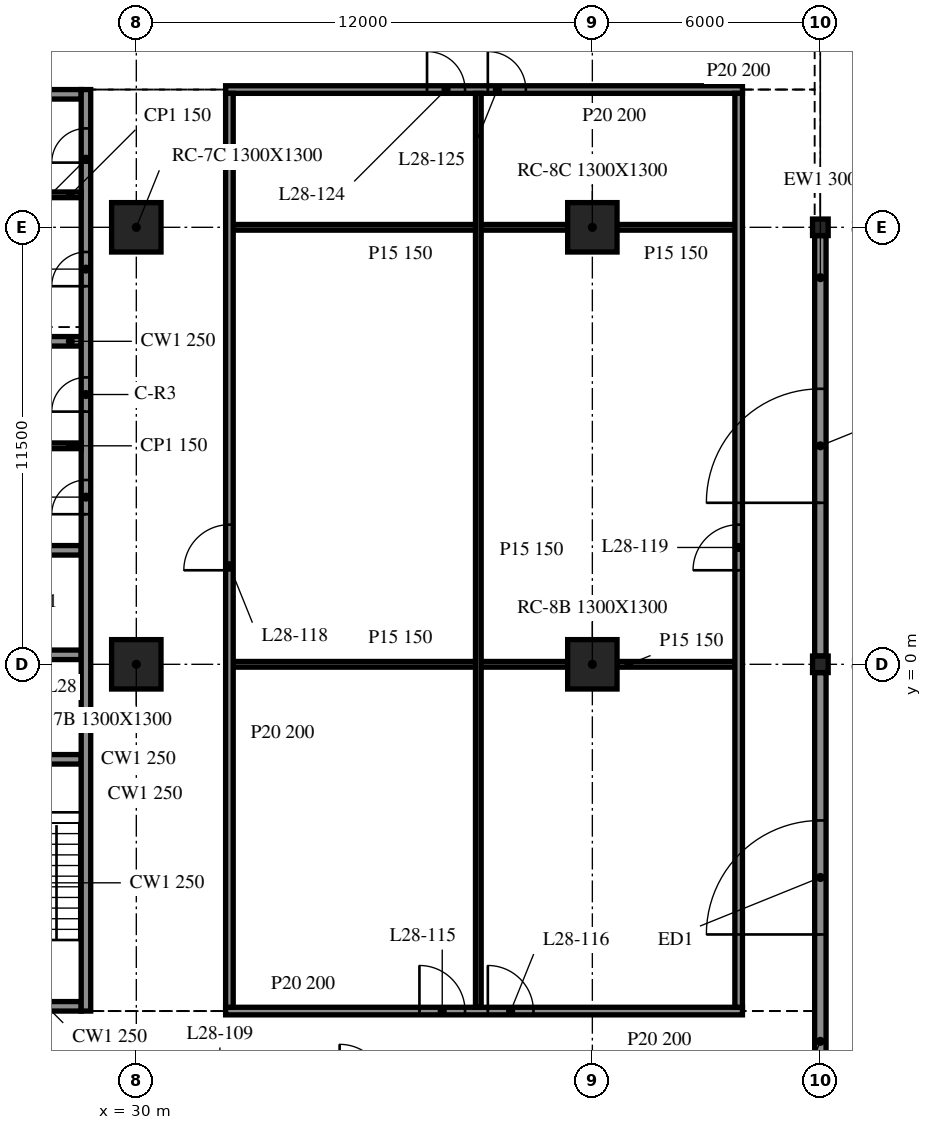
"""IFC4 building model, lengths in metres.
Left out: names, types, materials, properties, quantities, classifications, styles, units other than length and angle.
Written with IfcOpenShell. Run it as: python <this file> out.ifc"""

import sys

from ifc_helpers import new_model, si_unit, direction, frame, frame_2d, origin, origin_2d, place, context, subcontext, project, spatial, rectangle, i_section, extrude, element, fill, save


model = new_model("IFC4")
c1 = context("Model", 3, precision=1e-05, world=origin(), true_north=direction((0.0, 1.0)))
c2 = subcontext(c1, "Body", "Model", "MODEL_VIEW")
j1 = project(units=[si_unit("LENGTHUNIT", "METRE"), si_unit("PLANEANGLEUNIT", "RADIAN")], contexts=[c1])
p1 = place(None, origin())
s1 = spatial("IfcSite", under=j1, at=p1, CompositionType="ELEMENT")
p2 = place(p1, origin())
s2 = spatial("IfcBuilding", under=s1, at=p2, CompositionType="ELEMENT")
p3 = place(p2, frame((0.0, 0.0, 122.0)))
s3 = spatial("IfcBuildingStorey", under=s2, at=p3, CompositionType="ELEMENT", Elevation=122.0)
for number, where, z_axis, x_axis in (
    (1, (30.0, 0.0, -0.34), (0.0, 0.0, 1.0), (1.0, 0.0, 0.0)),
    (2, (30.0, 11.5, -0.34), (0.0, 0.0, 1.0), (1.0, 0.0, 0.0)),
    (3, (42.0, 0.0, -0.34), (0.0, 0.0, 1.0), (1.0, 0.0, 0.0)),
    (4, (42.0, 11.5, -0.34), (0.0, 0.0, 1.0), (1.0, 0.0, 0.0)),
):
    element("IfcColumn", number, at=place(p3, frame(where, z_axis=z_axis, x_axis=x_axis)), inside=s3, PredefinedType="COLUMN", context=c2, shape_type="SweptSolid", body=[
        extrude(rectangle(XDim=1.3, YDim=1.3, at=origin_2d()), origin(), (0.0, 0.0, 1.0), 4.1),
    ])
for number, where, z_axis, x_axis in (
    (5, (48.0, 0.0, -0.34), (0.0, 0.0, 1.0), (1.0, 0.0, 0.0)),
    (6, (48.0, 11.5, -0.34), (0.0, 0.0, 1.0), (1.0, 0.0, 0.0)),
):
    element("IfcColumn", number, at=place(p3, frame(where, z_axis=z_axis, x_axis=x_axis)), inside=s3, PredefinedType="COLUMN", context=c2, shape_type="SweptSolid", body=[
        extrude(i_section(OverallWidth=0.412, OverallDepth=0.434, WebThickness=0.036, FlangeThickness=0.057, at=origin_2d()), origin(), (0.0, 0.0, 1.0), 4.1),
    ])
p4 = place(p3, frame((48.0, -11.0, 0.0), z_axis=(0.0, 0.0, 1.0), x_axis=(0.0, 1.0, 0.0)))
e7 = element("IfcWall", 7, at=p4, inside=s3, PredefinedType="NOTDEFINED", context=c2, shape_type="SweptSolid", body=[
    extrude(rectangle(XDim=10.782, YDim=0.3, at=frame_2d((5.391, 0.0))), origin(), (0.0, 0.0, 1.0), 3.003),
])
p5 = place(p4, frame((3.891, 0.0, 0.0)))
e8 = element("IfcOpeningElement", 8, at=p5, cuts=e7, PredefinedType="OPENING", context=c2, shape_type="SweptSolid", body=[
    extrude(rectangle(XDim=3.0, YDim=2.4, at=frame_2d((1.5, 1.2))), frame((0.0, 0.16, 0.0), z_axis=(0.0, -1.0, 0.0), x_axis=(1.0, 0.0, 0.0)), (0.0, 0.0, 1.0), 0.32),
])
p6 = place(p3, frame((48.0, 0.218, 0.0), z_axis=(0.0, 0.0, 1.0), x_axis=(0.0, 1.0, 0.0)))
e9 = element("IfcWall", 9, at=p6, inside=s3, PredefinedType="NOTDEFINED", context=c2, shape_type="SweptSolid", body=[
    extrude(rectangle(XDim=11.064, YDim=0.3, at=frame_2d((5.532, 0.0))), origin(), (0.0, 0.0, 1.0), 3.003),
])
p7 = place(p6, frame((4.032, 0.0, 0.0)))
e10 = element("IfcOpeningElement", 10, at=p7, cuts=e9, PredefinedType="OPENING", context=c2, shape_type="SweptSolid", body=[
    extrude(rectangle(XDim=3.0, YDim=2.4, at=frame_2d((1.5, 1.2))), frame((0.0, 0.16, 0.0), z_axis=(0.0, -1.0, 0.0), x_axis=(1.0, 0.0, 0.0)), (0.0, 0.0, 1.0), 0.32),
])
p8 = place(p3, frame((28.675, -9.125, 0.0), z_axis=(0.0, 0.0, 1.0), x_axis=(0.0, 1.0, 0.0)))
e11 = element("IfcWall", 11, at=p8, inside=s3, PredefinedType="SOLIDWALL", context=c2, shape_type="SweptSolid", body=[
    extrude(rectangle(XDim=24.25, YDim=0.25, at=frame_2d((12.125, 0.0))), origin(), (0.0, 0.0, 1.0), 3.76),
])
p9 = place(p8, frame((13.075, 0.0, 0.0)))
e12 = element("IfcOpeningElement", 12, at=p9, cuts=e11, PredefinedType="OPENING", context=c2, shape_type="SweptSolid", body=[
    extrude(rectangle(XDim=0.9, YDim=2.1, at=frame_2d((0.45, 1.05))), frame((0.0, 0.135, 0.0), z_axis=(0.0, -1.0, 0.0), x_axis=(1.0, 0.0, 0.0)), (0.0, 0.0, 1.0), 0.27),
])
p10 = place(p8, frame((15.775, 0.0, 0.0)))
e13 = element("IfcOpeningElement", 13, at=p10, cuts=e11, PredefinedType="OPENING", context=c2, shape_type="SweptSolid", body=[
    extrude(rectangle(XDim=0.9, YDim=2.1, at=frame_2d((0.45, 1.05))), frame((0.0, 0.135, 0.0), z_axis=(0.0, -1.0, 0.0), x_axis=(1.0, 0.0, 0.0)), (0.0, 0.0, 1.0), 0.27),
])
p11 = place(p8, frame((19.075, 0.0, 0.0)))
e14 = element("IfcOpeningElement", 14, at=p11, cuts=e11, PredefinedType="OPENING", context=c2, shape_type="SweptSolid", body=[
    extrude(rectangle(XDim=0.9, YDim=2.1, at=frame_2d((0.45, 1.05))), frame((0.0, 0.135, 0.0), z_axis=(0.0, -1.0, 0.0), x_axis=(1.0, 0.0, 0.0)), (0.0, 0.0, 1.0), 0.27),
])
p12 = place(p8, frame((22.327, 0.0, 0.0)))
e15 = element("IfcOpeningElement", 15, at=p12, cuts=e11, PredefinedType="OPENING", context=c2, shape_type="SweptSolid", body=[
    extrude(rectangle(XDim=0.9, YDim=2.1, at=frame_2d((0.45, 1.05))), frame((0.0, 0.135, 0.0), z_axis=(0.0, -1.0, 0.0), x_axis=(1.0, 0.0, 0.0)), (0.0, 0.0, 1.0), 0.27),
])
p13 = place(p3, frame((28.55, -9.0, 0.0), z_axis=(0.0, 0.0, 1.0), x_axis=(-1.0, 0.0, 0.0)))
e16 = element("IfcWall", 16, at=p13, inside=s3, PredefinedType="SOLIDWALL", context=c2, shape_type="SweptSolid", body=[
    extrude(rectangle(XDim=9.1, YDim=0.25, at=frame_2d((4.55, 0.0))), origin(), (0.0, 0.0, 1.0), 3.76),
])
p14 = place(p13, frame((3.65, 0.0, 0.0)))
e17 = element("IfcOpeningElement", 17, at=p14, cuts=e16, PredefinedType="OPENING", context=c2, shape_type="SweptSolid", body=[
    extrude(rectangle(XDim=1.8, YDim=2.1, at=frame_2d((0.9, 1.05))), frame((0.0, 0.135, 0.0), z_axis=(0.0, -1.0, 0.0), x_axis=(1.0, 0.0, 0.0)), (0.0, 0.0, 1.0), 0.27),
])
p15 = place(p3, frame((19.45, 15.0, 0.0), z_axis=(0.0, 0.0, 1.0), x_axis=(1.0, 0.0, 0.0)))
e18 = element("IfcWall", 18, at=p15, inside=s3, PredefinedType="SOLIDWALL", context=c2, shape_type="SweptSolid", body=[
    extrude(rectangle(XDim=9.1, YDim=0.25, at=frame_2d((4.55, 0.0))), origin(), (0.0, 0.0, 1.0), 3.76),
])
p16 = place(p15, frame((3.65, 0.0, 0.0)))
e19 = element("IfcOpeningElement", 19, at=p16, cuts=e18, PredefinedType="OPENING", context=c2, shape_type="SweptSolid", body=[
    extrude(rectangle(XDim=1.8, YDim=2.1, at=frame_2d((0.9, 1.05))), frame((0.0, 0.135, 0.0), z_axis=(0.0, -1.0, 0.0), x_axis=(1.0, 0.0, 0.0)), (0.0, 0.0, 1.0), 0.27),
])
for number, where, z_axis, x_axis in (
    (20, (25.7, -2.5, 0.0), (0.0, 0.0, 1.0), (1.0, 0.0, 0.0)),
    (21, (25.7, 0.25, 0.0), (0.0, 0.0, 1.0), (1.0, 0.0, 0.0)),
    (22, (25.7, 3.0, 0.0), (0.0, 0.0, 1.0), (1.0, 0.0, 0.0)),
    (23, (25.7, 8.5, 0.0), (0.0, 0.0, 1.0), (1.0, 0.0, 0.0)),
):
    element("IfcWall", number, at=place(p3, frame(where, z_axis=z_axis, x_axis=x_axis)), inside=s3, PredefinedType="SOLIDWALL", context=c2, shape_type="SweptSolid", body=[
        extrude(rectangle(XDim=2.85, YDim=0.25, at=frame_2d((1.425, 0.0))), origin(), (0.0, 0.0, 1.0), 3.76),
    ])
for number, where, z_axis, x_axis in (
    (24, (25.7, 5.75, 0.0), (0.0, 0.0, 1.0), (1.0, 0.0, 0.0)),
    (25, (25.7, 12.355, 0.0), (0.0, 0.0, 1.0), (1.0, 0.0, 0.0)),
):
    element("IfcWall", number, at=place(p3, frame(where, z_axis=z_axis, x_axis=x_axis)), inside=s3, PredefinedType="PARTITIONING", context=c2, shape_type="SweptSolid", body=[
        extrude(rectangle(XDim=2.85, YDim=0.15, at=frame_2d((1.425, 0.0))), origin(), (0.0, 0.0, 1.0), 3.76),
    ])
p17 = place(p3, frame((32.35, -9.125, 0.0), z_axis=(0.0, 0.0, 1.0), x_axis=(1.0, 0.0, 0.0)))
e26 = element("IfcWall", 26, at=p17, inside=s3, PredefinedType="PARTITIONING", context=c2, shape_type="SweptSolid", body=[
    extrude(rectangle(XDim=13.6, YDim=0.2, at=frame_2d((6.8, 0.0))), origin(), (0.0, 0.0, 1.0), 3.76),
])
p18 = place(p17, frame((5.1, 0.0, 0.0)))
e27 = element("IfcOpeningElement", 27, at=p18, cuts=e26, PredefinedType="OPENING", context=c2, shape_type="SweptSolid", body=[
    extrude(rectangle(XDim=1.2, YDim=2.1, at=frame_2d((0.6, 1.05))), frame((0.0, 0.11, 0.0), z_axis=(0.0, -1.0, 0.0), x_axis=(1.0, 0.0, 0.0)), (0.0, 0.0, 1.0), 0.22),
])
p19 = place(p17, frame((6.9, 0.0, 0.0)))
e28 = element("IfcOpeningElement", 28, at=p19, cuts=e26, PredefinedType="OPENING", context=c2, shape_type="SweptSolid", body=[
    extrude(rectangle(XDim=1.2, YDim=2.1, at=frame_2d((0.6, 1.05))), frame((0.0, 0.11, 0.0), z_axis=(0.0, -1.0, 0.0), x_axis=(1.0, 0.0, 0.0)), (0.0, 0.0, 1.0), 0.22),
])
p20 = place(p3, frame((32.55, 0.0, 0.0), z_axis=(0.0, 0.0, 1.0), x_axis=(1.0, 0.0, 0.0)))
e29 = element("IfcWall", 29, at=p20, inside=s3, PredefinedType="PARTITIONING", context=c2, shape_type="SweptSolid", body=[
    extrude(rectangle(XDim=8.8, YDim=0.15, at=frame_2d((4.4, 0.0))), origin(), (0.0, 0.0, 1.0), 3.76),
])
p21 = place(p3, frame((42.65, 0.0, 0.0), z_axis=(0.0, 0.0, 1.0), x_axis=(1.0, 0.0, 0.0)))
e30 = element("IfcWall", 30, at=p21, inside=s3, PredefinedType="PARTITIONING", context=c2, shape_type="SweptSolid", body=[
    extrude(rectangle(XDim=3.1, YDim=0.15, at=frame_2d((1.55, 0.0))), origin(), (0.0, 0.0, 1.0), 3.76),
])
p22 = place(p3, frame((32.55, 11.5, 0.0), z_axis=(0.0, 0.0, 1.0), x_axis=(1.0, 0.0, 0.0)))
e31 = element("IfcWall", 31, at=p22, inside=s3, PredefinedType="PARTITIONING", context=c2, shape_type="SweptSolid", body=[
    extrude(rectangle(XDim=8.8, YDim=0.15, at=frame_2d((4.4, 0.0))), origin(), (0.0, 0.0, 1.0), 3.76),
])
p23 = place(p3, frame((42.65, 11.5, 0.0), z_axis=(0.0, 0.0, 1.0), x_axis=(1.0, 0.0, 0.0)))
e32 = element("IfcWall", 32, at=p23, inside=s3, PredefinedType="PARTITIONING", context=c2, shape_type="SweptSolid", body=[
    extrude(rectangle(XDim=3.1, YDim=0.15, at=frame_2d((1.55, 0.0))), origin(), (0.0, 0.0, 1.0), 3.76),
])
p24 = place(p3, frame((32.35, 15.125, 0.0), z_axis=(0.0, 0.0, 1.0), x_axis=(1.0, 0.0, 0.0)))
e33 = element("IfcWall", 33, at=p24, inside=s3, PredefinedType="PARTITIONING", context=c2, shape_type="SweptSolid", body=[
    extrude(rectangle(XDim=13.6, YDim=0.2, at=frame_2d((6.8, 0.0))), origin(), (0.0, 0.0, 1.0), 3.76),
])
p25 = place(p24, frame((5.3, 0.0, 0.0)))
e34 = element("IfcOpeningElement", 34, at=p25, cuts=e33, PredefinedType="OPENING", context=c2, shape_type="SweptSolid", body=[
    extrude(rectangle(XDim=1.0, YDim=2.1, at=frame_2d((0.5, 1.05))), frame((0.0, 0.11, 0.0), z_axis=(0.0, -1.0, 0.0), x_axis=(1.0, 0.0, 0.0)), (0.0, 0.0, 1.0), 0.22),
])
p26 = place(p24, frame((6.9, 0.0, 0.0)))
e35 = element("IfcOpeningElement", 35, at=p26, cuts=e33, PredefinedType="OPENING", context=c2, shape_type="SweptSolid", body=[
    extrude(rectangle(XDim=1.0, YDim=2.1, at=frame_2d((0.5, 1.05))), frame((0.0, 0.11, 0.0), z_axis=(0.0, -1.0, 0.0), x_axis=(1.0, 0.0, 0.0)), (0.0, 0.0, 1.0), 0.22),
])
p27 = place(p3, frame((32.45, -9.025, 0.0), z_axis=(0.0, 0.0, 1.0), x_axis=(0.0, 1.0, 0.0)))
e36 = element("IfcWall", 36, at=p27, inside=s3, PredefinedType="PARTITIONING", context=c2, shape_type="SweptSolid", body=[
    extrude(rectangle(XDim=24.05, YDim=0.2, at=frame_2d((12.025, 0.0))), origin(), (0.0, 0.0, 1.0), 3.76),
])
p28 = place(p27, frame((11.5, 0.0, 0.0)))
e37 = element("IfcOpeningElement", 37, at=p28, cuts=e36, PredefinedType="OPENING", context=c2, shape_type="SweptSolid", body=[
    extrude(rectangle(XDim=1.2, YDim=2.1, at=frame_2d((0.6, 1.05))), frame((0.0, 0.11, 0.0), z_axis=(0.0, -1.0, 0.0), x_axis=(1.0, 0.0, 0.0)), (0.0, 0.0, 1.0), 0.22),
])
p29 = place(p3, frame((39.0, -9.025, 0.0), z_axis=(0.0, 0.0, 1.0), x_axis=(0.0, 1.0, 0.0)))
e38 = element("IfcWall", 38, at=p29, inside=s3, PredefinedType="PARTITIONING", context=c2, shape_type="SweptSolid", body=[
    extrude(rectangle(XDim=24.05, YDim=0.15, at=frame_2d((12.025, 0.0))), origin(), (0.0, 0.0, 1.0), 3.76),
])
p30 = place(p3, frame((45.85, -9.025, 0.0), z_axis=(0.0, 0.0, 1.0), x_axis=(0.0, 1.0, 0.0)))
e39 = element("IfcWall", 39, at=p30, inside=s3, PredefinedType="PARTITIONING", context=c2, shape_type="SweptSolid", body=[
    extrude(rectangle(XDim=24.05, YDim=0.2, at=frame_2d((12.025, 0.0))), origin(), (0.0, 0.0, 1.0), 3.76),
])
p31 = place(p30, frame((11.5, 0.0, 0.0)))
e40 = element("IfcOpeningElement", 40, at=p31, cuts=e39, PredefinedType="OPENING", context=c2, shape_type="SweptSolid", body=[
    extrude(rectangle(XDim=1.2, YDim=2.1, at=frame_2d((0.6, 1.05))), frame((0.0, 0.11, 0.0), z_axis=(0.0, -1.0, 0.0), x_axis=(1.0, 0.0, 0.0)), (0.0, 0.0, 1.0), 0.22),
])
p32 = place(p5, origin())
e41 = element("IfcDoor", 41, at=p32, inside=s3, OperationType="SINGLE_SWING_LEFT", PredefinedType="DOOR", context=c2, shape_type="SweptSolid", body=[
    extrude(rectangle(XDim=3.0, YDim=2.4, at=frame_2d((1.5, 1.2))), frame((0.0, 0.025, 0.0), z_axis=(0.0, -1.0, 0.0), x_axis=(1.0, 0.0, 0.0)), (0.0, 0.0, 1.0), 0.05),
])
fill(e8, e41)
p33 = place(p7, origin())
e42 = element("IfcDoor", 42, at=p33, inside=s3, OperationType="SINGLE_SWING_LEFT", PredefinedType="DOOR", context=c2, shape_type="SweptSolid", body=[
    extrude(rectangle(XDim=3.0, YDim=2.4, at=frame_2d((1.5, 1.2))), frame((0.0, 0.025, 0.0), z_axis=(0.0, -1.0, 0.0), x_axis=(1.0, 0.0, 0.0)), (0.0, 0.0, 1.0), 0.05),
])
fill(e10, e42)
p34 = place(p9, origin())
e43 = element("IfcDoor", 43, at=p34, inside=s3, OperationType="SINGLE_SWING_RIGHT", PredefinedType="DOOR", context=c2, shape_type="SweptSolid", body=[
    extrude(rectangle(XDim=0.9, YDim=2.1, at=frame_2d((0.45, 1.05))), frame((0.0, 0.025, 0.0), z_axis=(0.0, -1.0, 0.0), x_axis=(1.0, 0.0, 0.0)), (0.0, 0.0, 1.0), 0.05),
])
fill(e12, e43)
p35 = place(p10, origin())
e44 = element("IfcDoor", 44, at=p35, inside=s3, OperationType="SINGLE_SWING_LEFT", PredefinedType="DOOR", context=c2, shape_type="SweptSolid", body=[
    extrude(rectangle(XDim=0.9, YDim=2.1, at=frame_2d((0.45, 1.05))), frame((0.0, 0.025, 0.0), z_axis=(0.0, -1.0, 0.0), x_axis=(1.0, 0.0, 0.0)), (0.0, 0.0, 1.0), 0.05),
])
fill(e13, e44)
p36 = place(p11, origin())
e45 = element("IfcDoor", 45, at=p36, inside=s3, OperationType="SINGLE_SWING_LEFT", PredefinedType="DOOR", context=c2, shape_type="SweptSolid", body=[
    extrude(rectangle(XDim=0.9, YDim=2.1, at=frame_2d((0.45, 1.05))), frame((0.0, 0.025, 0.0), z_axis=(0.0, -1.0, 0.0), x_axis=(1.0, 0.0, 0.0)), (0.0, 0.0, 1.0), 0.05),
])
fill(e14, e45)
p37 = place(p12, origin())
e46 = element("IfcDoor", 46, at=p37, inside=s3, OperationType="SINGLE_SWING_RIGHT", PredefinedType="DOOR", context=c2, shape_type="SweptSolid", body=[
    extrude(rectangle(XDim=0.9, YDim=2.1, at=frame_2d((0.45, 1.05))), frame((0.0, 0.025, 0.0), z_axis=(0.0, -1.0, 0.0), x_axis=(1.0, 0.0, 0.0)), (0.0, 0.0, 1.0), 0.05),
])
fill(e15, e46)
p38 = place(p18, origin())
e47 = element("IfcDoor", 47, at=p38, inside=s3, OperationType="SINGLE_SWING_LEFT", PredefinedType="DOOR", context=c2, shape_type="SweptSolid", body=[
    extrude(rectangle(XDim=1.2, YDim=2.1, at=frame_2d((0.6, 1.05))), frame((0.0, 0.025, 0.0), z_axis=(0.0, -1.0, 0.0), x_axis=(1.0, 0.0, 0.0)), (0.0, 0.0, 1.0), 0.05),
])
fill(e27, e47)
p39 = place(p19, origin())
e48 = element("IfcDoor", 48, at=p39, inside=s3, OperationType="SINGLE_SWING_RIGHT", PredefinedType="DOOR", context=c2, shape_type="SweptSolid", body=[
    extrude(rectangle(XDim=1.2, YDim=2.1, at=frame_2d((0.6, 1.05))), frame((0.0, 0.025, 0.0), z_axis=(0.0, -1.0, 0.0), x_axis=(1.0, 0.0, 0.0)), (0.0, 0.0, 1.0), 0.05),
])
fill(e28, e48)
p40 = place(p28, origin())
e49 = element("IfcDoor", 49, at=p40, inside=s3, OperationType="SINGLE_SWING_LEFT", PredefinedType="DOOR", context=c2, shape_type="SweptSolid", body=[
    extrude(rectangle(XDim=1.2, YDim=2.1, at=frame_2d((0.6, 1.05))), frame((0.0, 0.025, 0.0), z_axis=(0.0, -1.0, 0.0), x_axis=(1.0, 0.0, 0.0)), (0.0, 0.0, 1.0), 0.05),
])
fill(e37, e49)
p41 = place(p31, origin())
e50 = element("IfcDoor", 50, at=p41, inside=s3, OperationType="SINGLE_SWING_RIGHT", PredefinedType="DOOR", context=c2, shape_type="SweptSolid", body=[
    extrude(rectangle(XDim=1.2, YDim=2.1, at=frame_2d((0.6, 1.05))), frame((0.0, 0.025, 0.0), z_axis=(0.0, -1.0, 0.0), x_axis=(1.0, 0.0, 0.0)), (0.0, 0.0, 1.0), 0.05),
])
fill(e40, e50)
p42 = place(p25, origin())
e51 = element("IfcDoor", 51, at=p42, inside=s3, OperationType="SINGLE_SWING_RIGHT", PredefinedType="DOOR", context=c2, shape_type="SweptSolid", body=[
    extrude(rectangle(XDim=1.0, YDim=2.1, at=frame_2d((0.5, 1.05))), frame((0.0, 0.025, 0.0), z_axis=(0.0, -1.0, 0.0), x_axis=(1.0, 0.0, 0.0)), (0.0, 0.0, 1.0), 0.05),
])
fill(e34, e51)
p43 = place(p26, origin())
e52 = element("IfcDoor", 52, at=p43, inside=s3, OperationType="SINGLE_SWING_LEFT", PredefinedType="DOOR", context=c2, shape_type="SweptSolid", body=[
    extrude(rectangle(XDim=1.0, YDim=2.1, at=frame_2d((0.5, 1.05))), frame((0.0, 0.025, 0.0), z_axis=(0.0, -1.0, 0.0), x_axis=(1.0, 0.0, 0.0)), (0.0, 0.0, 1.0), 0.05),
])
fill(e35, e52)
save(model, sys.argv[1])
